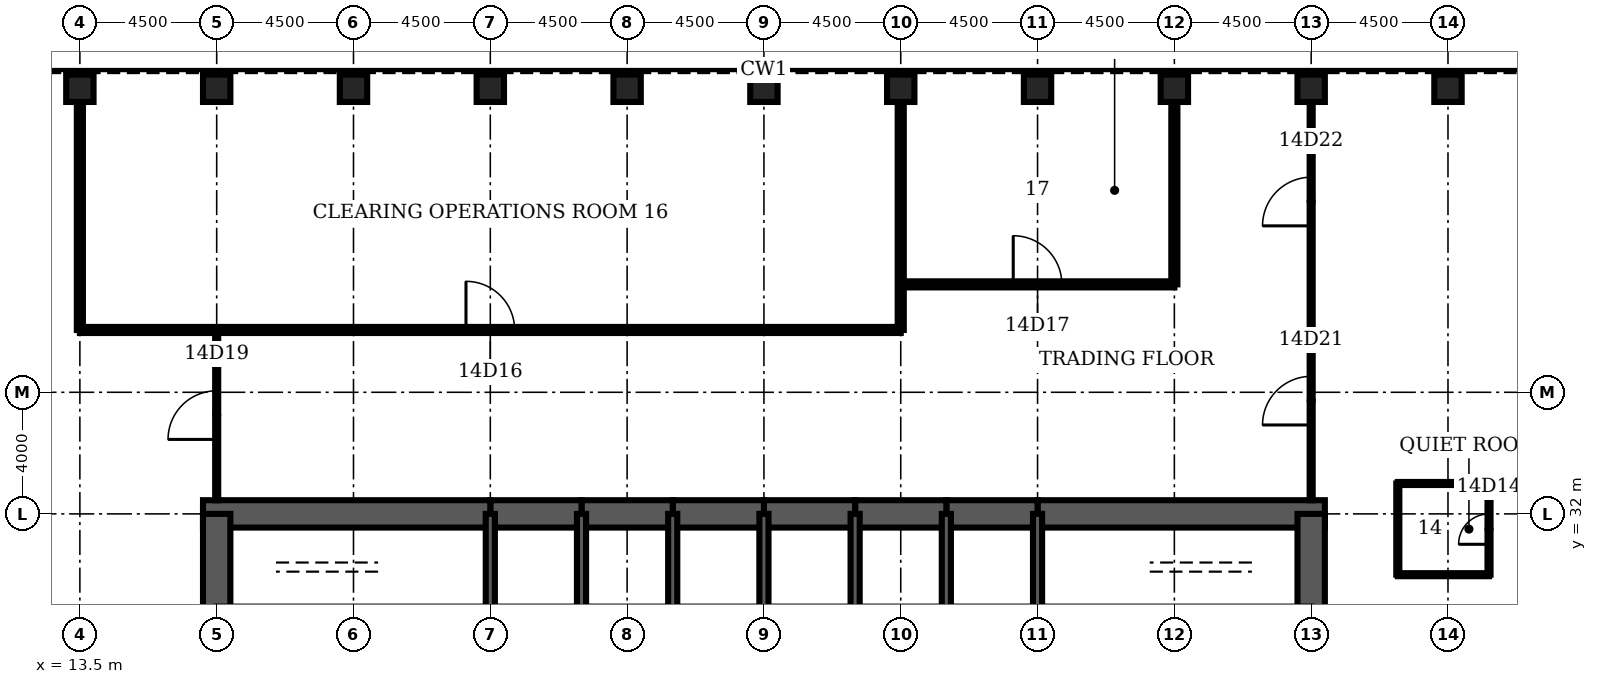
"""IFC4 building model, lengths in metres.
Left out: names, types, materials, properties, quantities, classifications, styles, units other than length and angle.
Written with IfcOpenShell. Run it as: python <this file> out.ifc"""

import sys

from ifc_helpers import new_model, si_unit, direction, frame, frame_2d, origin, origin_2d, place, context, subcontext, project, spatial, rectangle, hollow_rectangle, extrude, element, fill, save


model = new_model("IFC4")
c1 = context("Model", 3, precision=1e-05, world=origin(), true_north=direction((0.0, 1.0)))
c2 = subcontext(c1, "Body", "Model", "MODEL_VIEW")
j1 = project(units=[si_unit("LENGTHUNIT", "METRE"), si_unit("PLANEANGLEUNIT", "RADIAN")], contexts=[c1])
p1 = place(None, origin())
s1 = spatial("IfcSite", under=j1, at=p1, CompositionType="ELEMENT")
p2 = place(p1, origin())
s2 = spatial("IfcBuilding", under=s1, at=p2, CompositionType="ELEMENT")
p3 = place(p2, frame((0.0, 0.0, 68.0)))
s3 = spatial("IfcBuildingStorey", under=s2, at=p3, CompositionType="ELEMENT", Elevation=68.0)
for number, where, z_axis, x_axis in (
    (1, (58.5, 46.0, 0.0), (0.0, 0.0, 1.0), (0.0, 1.0, 0.0)),
    (2, (54.0, 46.0, 0.0), (0.0, 0.0, 1.0), (0.0, 1.0, 0.0)),
    (3, (49.5, 46.0, 0.0), (0.0, 0.0, 1.0), (0.0, 1.0, 0.0)),
    (4, (45.0, 46.0, 0.0), (0.0, 0.0, 1.0), (0.0, 1.0, 0.0)),
    (5, (40.5, 46.0, 0.0), (0.0, 0.0, 1.0), (0.0, 1.0, 0.0)),
    (6, (36.0, 46.0, 0.0), (0.0, 0.0, 1.0), (0.0, 1.0, 0.0)),
    (7, (31.5, 46.0, 0.0), (0.0, 0.0, 1.0), (0.0, 1.0, 0.0)),
    (8, (27.0, 46.0, 0.0), (0.0, 0.0, 1.0), (0.0, 1.0, 0.0)),
    (9, (22.5, 46.0, 0.0), (0.0, 0.0, 1.0), (0.0, 1.0, 0.0)),
    (10, (18.0, 46.0, 0.0), (0.0, 0.0, 1.0), (0.0, 1.0, 0.0)),
    (11, (13.5, 46.0, 0.0), (0.0, 0.0, 1.0), (0.0, 1.0, 0.0)),
):
    element("IfcColumn", number, at=place(p3, frame(where, z_axis=z_axis, x_axis=x_axis)), inside=s3, PredefinedType="COLUMN", context=c2, shape_type="SweptSolid", body=[
        extrude(hollow_rectangle(XDim=0.9, YDim=0.9, WallThickness=0.12, at=origin_2d()), origin(), (0.0, 0.0, 1.0), 4.5),
    ])
p4 = place(p3, frame((54.45, 32.0, 0.0), z_axis=(0.0, 0.0, 1.0), x_axis=(-1.0, 0.0, 0.0)))
e12 = element("IfcWall", 12, at=p4, inside=s3, PredefinedType="SHEAR", context=c2, shape_type="SweptSolid", body=[
    extrude(rectangle(XDim=9.45, YDim=0.9, at=frame_2d((4.725, 0.0))), origin(), (0.0, 0.0, 1.0), 4.5),
])
for number, where, z_axis, x_axis in (
    (13, (45.0, 32.0, 0.0), (0.0, 0.0, 1.0), (-1.0, 0.0, 0.0)),
    (14, (42.0, 32.0, 0.0), (0.0, 0.0, 1.0), (-1.0, 0.0, 0.0)),
    (15, (39.0, 32.0, 0.0), (0.0, 0.0, 1.0), (-1.0, 0.0, 0.0)),
    (16, (36.0, 32.0, 0.0), (0.0, 0.0, 1.0), (-1.0, 0.0, 0.0)),
    (17, (33.0, 32.0, 0.0), (0.0, 0.0, 1.0), (-1.0, 0.0, 0.0)),
    (18, (30.0, 32.0, 0.0), (0.0, 0.0, 1.0), (-1.0, 0.0, 0.0)),
):
    element("IfcWall", number, at=place(p3, frame(where, z_axis=z_axis, x_axis=x_axis)), inside=s3, PredefinedType="SHEAR", context=c2, shape_type="SweptSolid", body=[
        extrude(rectangle(XDim=3.0, YDim=0.9, at=frame_2d((1.5, 0.0))), origin(), (0.0, 0.0, 1.0), 4.5),
    ])
p5 = place(p3, frame((27.0, 32.0, 0.0), z_axis=(0.0, 0.0, 1.0), x_axis=(-1.0, 0.0, 0.0)))
e19 = element("IfcWall", 19, at=p5, inside=s3, PredefinedType="SHEAR", context=c2, shape_type="SweptSolid", body=[
    extrude(rectangle(XDim=9.45, YDim=0.9, at=frame_2d((4.725, 0.0))), origin(), (0.0, 0.0, 1.0), 4.5),
])
for number, where, z_axis, x_axis in (
    (20, (18.0, 32.0, 0.0), (0.0, 0.0, 1.0), (0.0, -1.0, 0.0)),
    (21, (54.0, 28.8, 0.0), (0.0, 0.0, 1.0), (0.0, 1.0, 0.0)),
):
    element("IfcWall", number, at=place(p3, frame(where, z_axis=z_axis, x_axis=x_axis)), inside=s3, PredefinedType="SHEAR", context=c2, shape_type="SweptSolid", body=[
        extrude(rectangle(XDim=3.2, YDim=0.9, at=frame_2d((1.6, 0.0))), origin(), (0.0, 0.0, 1.0), 4.5),
    ])
for number, where, z_axis, x_axis in (
    (22, (27.0, 28.8, 0.0), (0.0, 0.0, 1.0), (0.0, 1.0, 0.0)),
    (23, (30.0, 28.8, 0.0), (0.0, 0.0, 1.0), (0.0, 1.0, 0.0)),
    (24, (33.0, 28.8, 0.0), (0.0, 0.0, 1.0), (0.0, 1.0, 0.0)),
    (25, (36.0, 28.8, 0.0), (0.0, 0.0, 1.0), (0.0, 1.0, 0.0)),
    (26, (39.0, 28.8, 0.0), (0.0, 0.0, 1.0), (0.0, 1.0, 0.0)),
    (27, (42.0, 28.8, 0.0), (0.0, 0.0, 1.0), (0.0, 1.0, 0.0)),
    (28, (45.0, 28.8, 0.0), (0.0, 0.0, 1.0), (0.0, 1.0, 0.0)),
):
    element("IfcWall", number, at=place(p3, frame(where, z_axis=z_axis, x_axis=x_axis)), inside=s3, PredefinedType="SOLIDWALL", context=c2, shape_type="SweptSolid", body=[
        extrude(rectangle(XDim=3.2, YDim=0.3, at=frame_2d((1.6, 0.0))), origin(), (0.0, 0.0, 1.0), 4.5),
    ])
for number, where, z_axis, x_axis in (
    (29, (56.85, 30.0, 0.0), (0.0, 0.0, 1.0), (1.0, 0.0, 0.0)),
    (30, (56.85, 33.0, 0.0), (0.0, 0.0, 1.0), (1.0, 0.0, 0.0)),
):
    element("IfcWall", number, at=place(p3, frame(where, z_axis=z_axis, x_axis=x_axis)), inside=s3, PredefinedType="PARTITIONING", context=c2, shape_type="SweptSolid", body=[
        extrude(rectangle(XDim=3.0, YDim=0.1, at=frame_2d((1.5, 0.0))), origin(), (0.0, 0.0, 1.0), 3.0),
    ])
p6 = place(p3, frame((13.5, 38.05, 0.0), z_axis=(0.0, 0.0, 1.0), x_axis=(1.0, 0.0, 0.0)))
e31 = element("IfcWall", 31, at=p6, inside=s3, PredefinedType="PARTITIONING", context=c2, shape_type="SweptSolid", body=[
    extrude(rectangle(XDim=27.0, YDim=0.2, at=frame_2d((13.5, 0.0))), origin(), (0.0, 0.0, 1.0), 3.0),
])
p7 = place(p6, frame((12.7, 0.0, 0.0)))
e32 = element("IfcOpeningElement", 32, at=p7, cuts=e31, PredefinedType="OPENING", context=c2, shape_type="SweptSolid", body=[
    extrude(rectangle(XDim=1.6, YDim=2.1, at=frame_2d((0.8, 1.05))), frame((0.0, 0.11, 0.0), z_axis=(0.0, -1.0, 0.0), x_axis=(1.0, 0.0, 0.0)), (0.0, 0.0, 1.0), 0.22),
])
p8 = place(p3, frame((40.5, 39.55, 0.0), z_axis=(0.0, 0.0, 1.0), x_axis=(1.0, 0.0, 0.0)))
e33 = element("IfcWall", 33, at=p8, inside=s3, PredefinedType="PARTITIONING", context=c2, shape_type="SweptSolid", body=[
    extrude(rectangle(XDim=9.0, YDim=0.2, at=frame_2d((4.5, 0.0))), origin(), (0.0, 0.0, 1.0), 3.0),
])
p9 = place(p8, frame((3.7, 0.0, 0.0)))
e34 = element("IfcOpeningElement", 34, at=p9, cuts=e33, PredefinedType="OPENING", context=c2, shape_type="SweptSolid", body=[
    extrude(rectangle(XDim=1.6, YDim=2.1, at=frame_2d((0.8, 1.05))), frame((0.0, 0.11, 0.0), z_axis=(0.0, -1.0, 0.0), x_axis=(1.0, 0.0, 0.0)), (0.0, 0.0, 1.0), 0.22),
])
p10 = place(p3, frame((13.5, 38.05, 0.0), z_axis=(0.0, 0.0, 1.0), x_axis=(0.0, 1.0, 0.0)))
e35 = element("IfcWall", 35, at=p10, inside=s3, PredefinedType="PARTITIONING", context=c2, shape_type="SweptSolid", body=[
    extrude(rectangle(XDim=7.5, YDim=0.2, at=frame_2d((3.75, 0.0))), origin(), (0.0, 0.0, 1.0), 3.0),
])
p11 = place(p3, frame((18.0, 32.45, 0.0), z_axis=(0.0, 0.0, 1.0), x_axis=(0.0, 1.0, 0.0)))
e36 = element("IfcWall", 36, at=p11, inside=s3, PredefinedType="PARTITIONING", context=c2, shape_type="SweptSolid", body=[
    extrude(rectangle(XDim=5.6, YDim=0.1, at=frame_2d((2.8, 0.0))), origin(), (0.0, 0.0, 1.0), 3.0),
])
p12 = place(p11, frame((2.0, 0.0, 0.0)))
e37 = element("IfcOpeningElement", 37, at=p12, cuts=e36, PredefinedType="OPENING", context=c2, shape_type="SweptSolid", body=[
    extrude(rectangle(XDim=1.6, YDim=2.1, at=frame_2d((0.8, 1.05))), frame((0.0, 0.06, 0.0), z_axis=(0.0, -1.0, 0.0), x_axis=(1.0, 0.0, 0.0)), (0.0, 0.0, 1.0), 0.12),
])
p13 = place(p3, frame((40.5, 38.05, 0.0), z_axis=(0.0, 0.0, 1.0), x_axis=(0.0, 1.0, 0.0)))
e38 = element("IfcWall", 38, at=p13, inside=s3, PredefinedType="PARTITIONING", context=c2, shape_type="SweptSolid", body=[
    extrude(rectangle(XDim=7.5, YDim=0.2, at=frame_2d((3.75, 0.0))), origin(), (0.0, 0.0, 1.0), 3.0),
])
p14 = place(p3, frame((49.5, 39.55, 0.0), z_axis=(0.0, 0.0, 1.0), x_axis=(0.0, 1.0, 0.0)))
e39 = element("IfcWall", 39, at=p14, inside=s3, PredefinedType="PARTITIONING", context=c2, shape_type="SweptSolid", body=[
    extrude(rectangle(XDim=6.0, YDim=0.2, at=frame_2d((3.0, 0.0))), origin(), (0.0, 0.0, 1.0), 3.0),
])
p15 = place(p3, frame((54.0, 32.45, 0.0), z_axis=(0.0, 0.0, 1.0), x_axis=(0.0, 1.0, 0.0)))
e40 = element("IfcWall", 40, at=p15, inside=s3, PredefinedType="PARTITIONING", context=c2, shape_type="SweptSolid", body=[
    extrude(rectangle(XDim=13.1, YDim=0.1, at=frame_2d((6.55, 0.0))), origin(), (0.0, 0.0, 1.0), 3.0),
])
p16 = place(p15, frame((2.475, 0.0, 0.0)))
e41 = element("IfcOpeningElement", 41, at=p16, cuts=e40, PredefinedType="OPENING", context=c2, shape_type="SweptSolid", body=[
    extrude(rectangle(XDim=1.6, YDim=2.1, at=frame_2d((0.8, 1.05))), frame((0.0, 0.06, 0.0), z_axis=(0.0, -1.0, 0.0), x_axis=(1.0, 0.0, 0.0)), (0.0, 0.0, 1.0), 0.12),
])
p17 = place(p15, frame((9.025, 0.0, 0.0)))
e42 = element("IfcOpeningElement", 42, at=p17, cuts=e40, PredefinedType="OPENING", context=c2, shape_type="SweptSolid", body=[
    extrude(rectangle(XDim=1.6, YDim=2.1, at=frame_2d((0.8, 1.05))), frame((0.0, 0.06, 0.0), z_axis=(0.0, -1.0, 0.0), x_axis=(1.0, 0.0, 0.0)), (0.0, 0.0, 1.0), 0.12),
])
p18 = place(p3, frame((56.85, 30.0, 0.0), z_axis=(0.0, 0.0, 1.0), x_axis=(0.0, 1.0, 0.0)))
e43 = element("IfcWall", 43, at=p18, inside=s3, PredefinedType="PARTITIONING", context=c2, shape_type="SweptSolid", body=[
    extrude(rectangle(XDim=3.0, YDim=0.1, at=frame_2d((1.5, 0.0))), origin(), (0.0, 0.0, 1.0), 3.0),
])
p19 = place(p3, frame((59.85, 30.0, 0.0), z_axis=(0.0, 0.0, 1.0), x_axis=(0.0, 1.0, 0.0)))
e44 = element("IfcWall", 44, at=p19, inside=s3, PredefinedType="PARTITIONING", context=c2, shape_type="SweptSolid", body=[
    extrude(rectangle(XDim=3.0, YDim=0.1, at=frame_2d((1.5, 0.0))), origin(), (0.0, 0.0, 1.0), 3.0),
])
p20 = place(p19, frame((1.0, 0.0, 0.0)))
e45 = element("IfcOpeningElement", 45, at=p20, cuts=e44, PredefinedType="OPENING", context=c2, shape_type="SweptSolid", body=[
    extrude(rectangle(XDim=1.0, YDim=2.1, at=frame_2d((0.5, 1.05))), frame((0.0, 0.06, 0.0), z_axis=(0.0, -1.0, 0.0), x_axis=(1.0, 0.0, 0.0)), (0.0, 0.0, 1.0), 0.12),
])
p21 = place(p20, origin())
e46 = element("IfcDoor", 46, at=p21, inside=s3, OperationType="SINGLE_SWING_LEFT", PredefinedType="DOOR", context=c2, shape_type="SweptSolid", body=[
    extrude(rectangle(XDim=1.0, YDim=2.1, at=frame_2d((0.5, 1.05))), frame((0.0, 0.025, 0.0), z_axis=(0.0, -1.0, 0.0), x_axis=(1.0, 0.0, 0.0)), (0.0, 0.0, 1.0), 0.05),
])
fill(e45, e46)
p22 = place(p7, origin())
e47 = element("IfcDoor", 47, at=p22, inside=s3, OperationType="SINGLE_SWING_LEFT", PredefinedType="DOOR", context=c2, shape_type="SweptSolid", body=[
    extrude(rectangle(XDim=1.6, YDim=2.1, at=frame_2d((0.8, 1.05))), frame((0.0, 0.025, 0.0), z_axis=(0.0, -1.0, 0.0), x_axis=(1.0, 0.0, 0.0)), (0.0, 0.0, 1.0), 0.05),
])
fill(e32, e47)
p23 = place(p9, origin())
e48 = element("IfcDoor", 48, at=p23, inside=s3, OperationType="SINGLE_SWING_LEFT", PredefinedType="DOOR", context=c2, shape_type="SweptSolid", body=[
    extrude(rectangle(XDim=1.6, YDim=2.1, at=frame_2d((0.8, 1.05))), frame((0.0, 0.025, 0.0), z_axis=(0.0, -1.0, 0.0), x_axis=(1.0, 0.0, 0.0)), (0.0, 0.0, 1.0), 0.05),
])
fill(e34, e48)
p24 = place(p12, origin())
e49 = element("IfcDoor", 49, at=p24, inside=s3, OperationType="SINGLE_SWING_LEFT", PredefinedType="DOOR", context=c2, shape_type="SweptSolid", body=[
    extrude(rectangle(XDim=1.6, YDim=2.1, at=frame_2d((0.8, 1.05))), frame((0.0, 0.025, 0.0), z_axis=(0.0, -1.0, 0.0), x_axis=(1.0, 0.0, 0.0)), (0.0, 0.0, 1.0), 0.05),
])
fill(e37, e49)
p25 = place(p16, origin())
e50 = element("IfcDoor", 50, at=p25, inside=s3, OperationType="SINGLE_SWING_LEFT", PredefinedType="DOOR", context=c2, shape_type="SweptSolid", body=[
    extrude(rectangle(XDim=1.6, YDim=2.1, at=frame_2d((0.8, 1.05))), frame((0.0, 0.025, 0.0), z_axis=(0.0, -1.0, 0.0), x_axis=(1.0, 0.0, 0.0)), (0.0, 0.0, 1.0), 0.05),
])
fill(e41, e50)
p26 = place(p17, origin())
e51 = element("IfcDoor", 51, at=p26, inside=s3, OperationType="SINGLE_SWING_LEFT", PredefinedType="DOOR", context=c2, shape_type="SweptSolid", body=[
    extrude(rectangle(XDim=1.6, YDim=2.1, at=frame_2d((0.8, 1.05))), frame((0.0, 0.025, 0.0), z_axis=(0.0, -1.0, 0.0), x_axis=(1.0, 0.0, 0.0)), (0.0, 0.0, 1.0), 0.05),
])
fill(e42, e51)
save(model, sys.argv[1])
